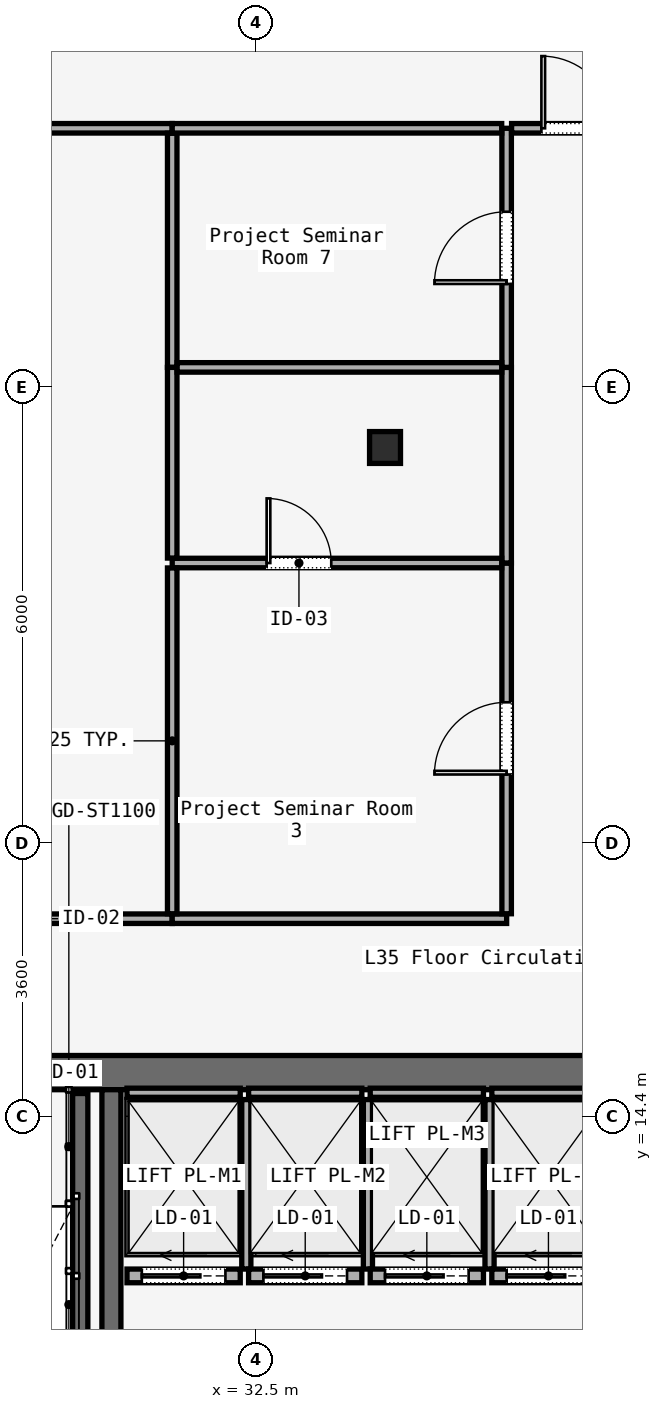
"""IFC4 building model, lengths in metres.
Left out: names, types, materials, properties, quantities, classifications, styles, units other than length and angle.
Written with IfcOpenShell. Run it as: python <this file> out.ifc"""

import sys

from ifc_helpers import new_model, si_unit, direction, frame, frame_2d, origin, origin_2d, place, context, subcontext, project, spatial, rectangle, i_section, extrude, element, fill, save


model = new_model("IFC4")
c1 = context("Model", 3, precision=1e-05, world=origin(), true_north=direction((0.0, 1.0)))
c2 = subcontext(c1, "Body", "Model", "MODEL_VIEW")
j1 = project(units=[si_unit("LENGTHUNIT", "METRE"), si_unit("PLANEANGLEUNIT", "RADIAN")], contexts=[c1])
p1 = place(None, origin())
s1 = spatial("IfcSite", under=j1, at=p1, CompositionType="ELEMENT")
p2 = place(p1, origin())
s2 = spatial("IfcBuilding", under=s1, at=p2, CompositionType="ELEMENT")
p3 = place(p2, frame((0.0, 0.0, 149.8)))
s3 = spatial("IfcBuildingStorey", under=s2, at=p3, CompositionType="ELEMENT", Elevation=149.8)
p4 = place(p3, frame((26.45, 14.975, 0.0), z_axis=(0.0, 0.0, 1.0), x_axis=(1.0, 0.0, 0.0)))
e1 = element("IfcWall", 1, at=p4, inside=s3, PredefinedType="SOLIDWALL", context=c2, shape_type="SweptSolid", body=[
    extrude(rectangle(XDim=31.1, YDim=0.45, at=frame_2d((15.55, 0.0))), origin(), (0.0, 0.0, 1.0), 3.58),
])
p5 = place(p4, frame((1.65, 0.0, 0.0)))
e2 = element("IfcOpeningElement", 2, at=p5, cuts=e1, PredefinedType="OPENING", context=c2, shape_type="SweptSolid", body=[
    extrude(rectangle(XDim=1.1, YDim=2.2, at=frame_2d((0.55, 1.1))), frame((0.0, 0.225, 0.0), z_axis=(0.0, -1.0, 0.0), x_axis=(1.0, 0.0, 0.0)), (0.0, 0.0, 1.0), 0.45),
])
p6 = place(p4, frame((13.65, 0.0, 0.0)))
e3 = element("IfcOpeningElement", 3, at=p6, cuts=e1, PredefinedType="OPENING", context=c2, shape_type="SweptSolid", body=[
    extrude(rectangle(XDim=1.1, YDim=2.2, at=frame_2d((0.55, 1.1))), frame((0.0, 0.225, 0.0), z_axis=(0.0, -1.0, 0.0), x_axis=(1.0, 0.0, 0.0)), (0.0, 0.0, 1.0), 0.45),
])
p7 = place(p4, frame((25.55, 0.0, 0.0)))
e4 = element("IfcOpeningElement", 4, at=p7, cuts=e1, PredefinedType="OPENING", context=c2, shape_type="SweptSolid", body=[
    extrude(rectangle(XDim=1.1, YDim=2.2, at=frame_2d((0.55, 1.1))), frame((0.0, 0.225, 0.0), z_axis=(0.0, -1.0, 0.0), x_axis=(1.0, 0.0, 0.0)), (0.0, 0.0, 1.0), 0.45),
])
p8 = place(p4, frame((10.7, 0.0, 0.0)))
e5 = element("IfcOpeningElement", 5, at=p8, cuts=e1, PredefinedType="OPENING", context=c2, shape_type="SweptSolid", body=[
    extrude(rectangle(XDim=1.4, YDim=2.2, at=frame_2d((0.7, 1.1))), frame((0.0, 0.225, 0.0), z_axis=(0.0, -1.0, 0.0), x_axis=(1.0, 0.0, 0.0)), (0.0, 0.0, 1.0), 0.45),
])
p9 = place(p4, frame((19.35, 0.0, 0.0)))
e6 = element("IfcOpeningElement", 6, at=p9, cuts=e1, PredefinedType="OPENING", context=c2, shape_type="SweptSolid", body=[
    extrude(rectangle(XDim=1.1, YDim=2.2, at=frame_2d((0.55, 1.1))), frame((0.0, 0.225, 0.0), z_axis=(0.0, -1.0, 0.0), x_axis=(1.0, 0.0, 0.0)), (0.0, 0.0, 1.0), 0.45),
])
p10 = place(p4, frame((21.4, 0.0, 0.0)))
e7 = element("IfcOpeningElement", 7, at=p10, cuts=e1, PredefinedType="OPENING", context=c2, shape_type="SweptSolid", body=[
    extrude(rectangle(XDim=0.9, YDim=2.1, at=frame_2d((0.45, 1.05))), frame((0.0, 0.225, 0.0), z_axis=(0.0, -1.0, 0.0), x_axis=(1.0, 0.0, 0.0)), (0.0, 0.0, 1.0), 0.45),
])
p11 = place(p4, frame((23.35, 0.0, 0.0)))
e8 = element("IfcOpeningElement", 8, at=p11, cuts=e1, PredefinedType="OPENING", context=c2, shape_type="SweptSolid", body=[
    extrude(rectangle(XDim=1.3, YDim=2.3, at=frame_2d((0.65, 1.15))), frame((0.0, 0.225, 0.0), z_axis=(0.0, -1.0, 0.0), x_axis=(1.0, 0.0, 0.0)), (0.0, 0.0, 1.0), 0.45),
])
p12 = place(p3, frame((30.6, 5.85, 0.0), z_axis=(0.0, 0.0, 1.0), x_axis=(0.0, 1.0, 0.0)))
e9 = element("IfcWall", 9, at=p12, inside=s3, PredefinedType="SOLIDWALL", context=c2, shape_type="SweptSolid", body=[
    extrude(rectangle(XDim=8.9, YDim=0.25, at=frame_2d((4.45, 0.0))), origin(), (0.0, 0.0, 1.0), 3.58),
])
p13 = place(p3, frame((34.2, 23.2, 0.0), z_axis=(0.0, 0.0, 1.0), x_axis=(1.0, 0.0, 0.0)))
e10 = element("IfcColumn", 10, at=p13, inside=s3, PredefinedType="COLUMN", context=c2, shape_type="SweptSolid", body=[
    extrude(i_section(OverallWidth=0.407, OverallDepth=0.419, WebThickness=0.031, FlangeThickness=0.049, FilletRadius=0.015, at=origin_2d()), origin(), (0.0, 0.0, 1.0), 3.58),
])
p14 = place(p3, frame((30.19, 14.7, 0.0), z_axis=(0.0, 0.0, 1.0), x_axis=(0.0, -1.0, 0.0)))
e11 = element("IfcWall", 11, at=p14, inside=s3, PredefinedType="SOLIDWALL", context=c2, shape_type="SweptSolid", body=[
    extrude(rectangle(XDim=7.65, YDim=0.2, at=frame_2d((3.825, 0.0))), origin(), (0.0, 0.0, 1.0), 3.8),
])
p15 = place(p3, frame((30.805, 12.3, 0.0), z_axis=(0.0, 0.0, 1.0), x_axis=(1.0, 0.0, 0.0)))
e12 = element("IfcWall", 12, at=p15, inside=s3, PredefinedType="SOLIDWALL", context=c2, shape_type="SweptSolid", body=[
    extrude(rectangle(XDim=1.49, YDim=0.18, at=frame_2d((0.745, 0.0))), origin(), (0.0, 0.0, 1.0), 3.01),
])
p16 = place(p15, frame((0.195, 0.0, 0.0)))
e13 = element("IfcOpeningElement", 13, at=p16, cuts=e12, PredefinedType="OPENING", context=c2, shape_type="SweptSolid", body=[
    extrude(rectangle(XDim=1.1, YDim=2.2, at=frame_2d((0.55, 1.1))), frame((0.0, 0.09, 0.0), z_axis=(0.0, -1.0, 0.0), x_axis=(1.0, 0.0, 0.0)), (0.0, 0.0, 1.0), 0.18),
])
p17 = place(p3, frame((30.805, 14.71, 0.0), z_axis=(0.0, 0.0, 1.0), x_axis=(1.0, 0.0, 0.0)))
e14 = element("IfcWall", 14, at=p17, inside=s3, PredefinedType="SOLIDWALL", context=c2, shape_type="SweptSolid", body=[
    extrude(rectangle(XDim=1.49, YDim=0.12, at=frame_2d((0.745, 0.0))), origin(), (0.0, 0.0, 1.0), 3.01),
])
p18 = place(p3, frame((32.375, 12.39, 0.0), z_axis=(0.0, 0.0, 1.0), x_axis=(0.0, 1.0, 0.0)))
e15 = element("IfcWall", 15, at=p18, inside=s3, PredefinedType="SOLIDWALL", context=c2, shape_type="SweptSolid", body=[
    extrude(rectangle(XDim=2.23, YDim=0.12, at=frame_2d((1.115, 0.0))), origin(), (0.0, 0.0, 1.0), 3.01),
])
p19 = place(p3, frame((32.405, 12.3, 0.0), z_axis=(0.0, 0.0, 1.0), x_axis=(1.0, 0.0, 0.0)))
e16 = element("IfcWall", 16, at=p19, inside=s3, PredefinedType="SOLIDWALL", context=c2, shape_type="SweptSolid", body=[
    extrude(rectangle(XDim=1.49, YDim=0.18, at=frame_2d((0.745, 0.0))), origin(), (0.0, 0.0, 1.0), 3.01),
])
p20 = place(p19, frame((0.195, 0.0, 0.0)))
e17 = element("IfcOpeningElement", 17, at=p20, cuts=e16, PredefinedType="OPENING", context=c2, shape_type="SweptSolid", body=[
    extrude(rectangle(XDim=1.1, YDim=2.2, at=frame_2d((0.55, 1.1))), frame((0.0, 0.09, 0.0), z_axis=(0.0, -1.0, 0.0), x_axis=(1.0, 0.0, 0.0)), (0.0, 0.0, 1.0), 0.18),
])
p21 = place(p3, frame((32.405, 14.71, 0.0), z_axis=(0.0, 0.0, 1.0), x_axis=(1.0, 0.0, 0.0)))
e18 = element("IfcWall", 18, at=p21, inside=s3, PredefinedType="SOLIDWALL", context=c2, shape_type="SweptSolid", body=[
    extrude(rectangle(XDim=1.49, YDim=0.12, at=frame_2d((0.745, 0.0))), origin(), (0.0, 0.0, 1.0), 3.01),
])
p22 = place(p3, frame((33.975, 12.39, 0.0), z_axis=(0.0, 0.0, 1.0), x_axis=(0.0, 1.0, 0.0)))
e19 = element("IfcWall", 19, at=p22, inside=s3, PredefinedType="SOLIDWALL", context=c2, shape_type="SweptSolid", body=[
    extrude(rectangle(XDim=2.23, YDim=0.12, at=frame_2d((1.115, 0.0))), origin(), (0.0, 0.0, 1.0), 3.01),
])
p23 = place(p3, frame((34.005, 12.3, 0.0), z_axis=(0.0, 0.0, 1.0), x_axis=(1.0, 0.0, 0.0)))
e20 = element("IfcWall", 20, at=p23, inside=s3, PredefinedType="SOLIDWALL", context=c2, shape_type="SweptSolid", body=[
    extrude(rectangle(XDim=1.49, YDim=0.18, at=frame_2d((0.745, 0.0))), origin(), (0.0, 0.0, 1.0), 3.01),
])
p24 = place(p23, frame((0.195, 0.0, 0.0)))
e21 = element("IfcOpeningElement", 21, at=p24, cuts=e20, PredefinedType="OPENING", context=c2, shape_type="SweptSolid", body=[
    extrude(rectangle(XDim=1.1, YDim=2.2, at=frame_2d((0.55, 1.1))), frame((0.0, 0.09, 0.0), z_axis=(0.0, -1.0, 0.0), x_axis=(1.0, 0.0, 0.0)), (0.0, 0.0, 1.0), 0.18),
])
p25 = place(p3, frame((34.005, 14.71, 0.0), z_axis=(0.0, 0.0, 1.0), x_axis=(1.0, 0.0, 0.0)))
e22 = element("IfcWall", 22, at=p25, inside=s3, PredefinedType="SOLIDWALL", context=c2, shape_type="SweptSolid", body=[
    extrude(rectangle(XDim=1.49, YDim=0.12, at=frame_2d((0.745, 0.0))), origin(), (0.0, 0.0, 1.0), 3.01),
])
p26 = place(p3, frame((35.575, 12.39, 0.0), z_axis=(0.0, 0.0, 1.0), x_axis=(0.0, 1.0, 0.0)))
e23 = element("IfcWall", 23, at=p26, inside=s3, PredefinedType="SOLIDWALL", context=c2, shape_type="SweptSolid", body=[
    extrude(rectangle(XDim=2.23, YDim=0.12, at=frame_2d((1.115, 0.0))), origin(), (0.0, 0.0, 1.0), 3.01),
])
p27 = place(p3, frame((35.605, 12.3, 0.0), z_axis=(0.0, 0.0, 1.0), x_axis=(1.0, 0.0, 0.0)))
e24 = element("IfcWall", 24, at=p27, inside=s3, PredefinedType="SOLIDWALL", context=c2, shape_type="SweptSolid", body=[
    extrude(rectangle(XDim=1.49, YDim=0.18, at=frame_2d((0.745, 0.0))), origin(), (0.0, 0.0, 1.0), 3.01),
])
p28 = place(p27, frame((0.195, 0.0, 0.0)))
e25 = element("IfcOpeningElement", 25, at=p28, cuts=e24, PredefinedType="OPENING", context=c2, shape_type="SweptSolid", body=[
    extrude(rectangle(XDim=1.1, YDim=2.2, at=frame_2d((0.55, 1.1))), frame((0.0, 0.09, 0.0), z_axis=(0.0, -1.0, 0.0), x_axis=(1.0, 0.0, 0.0)), (0.0, 0.0, 1.0), 0.18),
])
p29 = place(p3, frame((35.605, 14.71, 0.0), z_axis=(0.0, 0.0, 1.0), x_axis=(1.0, 0.0, 0.0)))
e26 = element("IfcWall", 26, at=p29, inside=s3, PredefinedType="SOLIDWALL", context=c2, shape_type="SweptSolid", body=[
    extrude(rectangle(XDim=1.49, YDim=0.12, at=frame_2d((0.745, 0.0))), origin(), (0.0, 0.0, 1.0), 3.01),
])
p30 = place(p3, frame((25.665, 17.0, 0.0), z_axis=(0.0, 0.0, 1.0), x_axis=(1.0, 0.0, 0.0)))
e27 = element("IfcWall", 27, at=p30, inside=s3, PredefinedType="PARTITIONING", context=c2, shape_type="SweptSolid", body=[
    extrude(rectangle(XDim=5.735, YDim=0.125, at=frame_2d((2.867, 0.0))), origin(), (0.0, 0.0, 1.0), 3.01),
])
p31 = place(p30, frame((2.167, 0.0, 0.0)))
e28 = element("IfcOpeningElement", 28, at=p31, cuts=e27, PredefinedType="OPENING", context=c2, shape_type="SweptSolid", body=[
    extrude(rectangle(XDim=1.4, YDim=2.2, at=frame_2d((0.7, 1.1))), frame((0.0, 0.062, 0.0), z_axis=(0.0, -1.0, 0.0), x_axis=(1.0, 0.0, 0.0)), (0.0, 0.0, 1.0), 0.125),
])
p32 = place(p3, frame((31.4, 17.0, 0.0), z_axis=(0.0, 0.0, 1.0), x_axis=(1.0, 0.0, 0.0)))
e29 = element("IfcWall", 29, at=p32, inside=s3, PredefinedType="PARTITIONING", context=c2, shape_type="SweptSolid", body=[
    extrude(rectangle(XDim=4.4, YDim=0.125, at=frame_2d((2.2, 0.0))), origin(), (0.0, 0.0, 1.0), 3.01),
])
p33 = place(p3, frame((35.8, 17.065, 0.0), z_axis=(0.0, 0.0, 1.0), x_axis=(0.0, 1.0, 0.0)))
e30 = element("IfcWall", 30, at=p33, inside=s3, PredefinedType="PARTITIONING", context=c2, shape_type="SweptSolid", body=[
    extrude(rectangle(XDim=4.615, YDim=0.125, at=frame_2d((2.308, 0.0))), origin(), (0.0, 0.0, 1.0), 3.01),
])
p34 = place(p33, frame((1.833, 0.0, 0.0)))
e31 = element("IfcOpeningElement", 31, at=p34, cuts=e30, PredefinedType="OPENING", context=c2, shape_type="SweptSolid", body=[
    extrude(rectangle(XDim=0.95, YDim=2.2, at=frame_2d((0.475, 1.1))), frame((0.0, 0.062, 0.0), z_axis=(0.0, -1.0, 0.0), x_axis=(1.0, 0.0, 0.0)), (0.0, 0.0, 1.0), 0.125),
])
p35 = place(p3, frame((35.8, 21.68, 0.0), z_axis=(0.0, 0.0, 1.0), x_axis=(0.0, 1.0, 0.0)))
e32 = element("IfcWall", 32, at=p35, inside=s3, PredefinedType="PARTITIONING", context=c2, shape_type="SweptSolid", body=[
    extrude(rectangle(XDim=2.574, YDim=0.125, at=frame_2d((1.287, 0.0))), origin(), (0.0, 0.0, 1.0), 3.01),
])
p36 = place(p3, frame((35.8, 24.254, 0.0), z_axis=(0.0, 0.0, 1.0), x_axis=(0.0, 1.0, 0.0)))
e33 = element("IfcWall", 33, at=p36, inside=s3, PredefinedType="PARTITIONING", context=c2, shape_type="SweptSolid", body=[
    extrude(rectangle(XDim=3.146, YDim=0.125, at=frame_2d((1.573, 0.0))), origin(), (0.0, 0.0, 1.0), 3.01),
])
p37 = place(p36, frame((1.098, 0.0, 0.0)))
e34 = element("IfcOpeningElement", 34, at=p37, cuts=e33, PredefinedType="OPENING", context=c2, shape_type="SweptSolid", body=[
    extrude(rectangle(XDim=0.95, YDim=2.2, at=frame_2d((0.475, 1.1))), frame((0.0, 0.062, 0.0), z_axis=(0.0, -1.0, 0.0), x_axis=(1.0, 0.0, 0.0)), (0.0, 0.0, 1.0), 0.125),
])
p38 = place(p3, frame((35.865, 27.4, 0.0), z_axis=(0.0, 0.0, 1.0), x_axis=(1.0, 0.0, 0.0)))
e35 = element("IfcWall", 35, at=p38, inside=s3, PredefinedType="PARTITIONING", context=c2, shape_type="SweptSolid", body=[
    extrude(rectangle(XDim=1.735, YDim=0.125, at=frame_2d((0.868, 0.0))), origin(), (0.0, 0.0, 1.0), 3.01),
])
p39 = place(p38, frame((0.393, 0.0, 0.0)))
e36 = element("IfcOpeningElement", 36, at=p39, cuts=e35, PredefinedType="OPENING", context=c2, shape_type="SweptSolid", body=[
    extrude(rectangle(XDim=0.95, YDim=2.2, at=frame_2d((0.475, 1.1))), frame((0.0, 0.062, 0.0), z_axis=(0.0, -1.0, 0.0), x_axis=(1.0, 0.0, 0.0)), (0.0, 0.0, 1.0), 0.125),
])
p40 = place(p3, frame((31.4, 21.68, 0.0), z_axis=(0.0, 0.0, 1.0), x_axis=(1.0, 0.0, 0.0)))
e37 = element("IfcWall", 37, at=p40, inside=s3, PredefinedType="PARTITIONING", context=c2, shape_type="SweptSolid", body=[
    extrude(rectangle(XDim=4.335, YDim=0.125, at=frame_2d((2.167, 0.0))), origin(), (0.0, 0.0, 1.0), 3.01),
])
p41 = place(p40, frame((1.242, 0.0, 0.0)))
e38 = element("IfcOpeningElement", 38, at=p41, cuts=e37, PredefinedType="OPENING", context=c2, shape_type="SweptSolid", body=[
    extrude(rectangle(XDim=0.85, YDim=2.15, at=frame_2d((0.425, 1.075))), frame((0.0, 0.062, 0.0), z_axis=(0.0, -1.0, 0.0), x_axis=(1.0, 0.0, 0.0)), (0.0, 0.0, 1.0), 0.125),
])
p42 = place(p3, frame((31.4, 17.065, 0.0), z_axis=(0.0, 0.0, 1.0), x_axis=(0.0, 1.0, 0.0)))
e39 = element("IfcWall", 39, at=p42, inside=s3, PredefinedType="PARTITIONING", context=c2, shape_type="SweptSolid", body=[
    extrude(rectangle(XDim=4.55, YDim=0.125, at=frame_2d((2.275, 0.0))), origin(), (0.0, 0.0, 1.0), 3.01),
])
p43 = place(p3, frame((25.581, 27.4, 0.0), z_axis=(0.0, 0.0, 1.0), x_axis=(1.0, 0.0, 0.0)))
e40 = element("IfcWall", 40, at=p43, inside=s3, PredefinedType="PARTITIONING", context=c2, shape_type="SweptSolid", body=[
    extrude(rectangle(XDim=5.819, YDim=0.125, at=frame_2d((2.91, 0.0))), origin(), (0.0, 0.0, 1.0), 3.01),
])
p44 = place(p3, frame((31.4, 27.335, 0.0), z_axis=(0.0, 0.0, 1.0), x_axis=(0.0, -1.0, 0.0)))
e41 = element("IfcWall", 41, at=p44, inside=s3, PredefinedType="PARTITIONING", context=c2, shape_type="SweptSolid", body=[
    extrude(rectangle(XDim=3.081, YDim=0.125, at=frame_2d((1.541, 0.0))), origin(), (0.0, 0.0, 1.0), 3.01),
])
p45 = place(p3, frame((31.4, 24.254, 0.0), z_axis=(0.0, 0.0, 1.0), x_axis=(0.0, -1.0, 0.0)))
e42 = element("IfcWall", 42, at=p45, inside=s3, PredefinedType="PARTITIONING", context=c2, shape_type="SweptSolid", body=[
    extrude(rectangle(XDim=2.509, YDim=0.125, at=frame_2d((1.254, 0.0))), origin(), (0.0, 0.0, 1.0), 3.01),
])
p46 = place(p3, frame((31.465, 24.254, 0.0), z_axis=(0.0, 0.0, 1.0), x_axis=(1.0, 0.0, 0.0)))
e43 = element("IfcWall", 43, at=p46, inside=s3, PredefinedType="PARTITIONING", context=c2, shape_type="SweptSolid", body=[
    extrude(rectangle(XDim=4.27, YDim=0.125, at=frame_2d((2.135, 0.0))), origin(), (0.0, 0.0, 1.0), 3.01),
])
p47 = place(p3, frame((31.4, 27.4, 0.0), z_axis=(0.0, 0.0, 1.0), x_axis=(1.0, 0.0, 0.0)))
e44 = element("IfcWall", 44, at=p47, inside=s3, PredefinedType="PARTITIONING", context=c2, shape_type="SweptSolid", body=[
    extrude(rectangle(XDim=4.335, YDim=0.125, at=frame_2d((2.167, 0.0))), origin(), (0.0, 0.0, 1.0), 3.01),
])
p48 = place(p16, origin())
e45 = element("IfcDoor", 45, at=p48, inside=s3, OperationType="SLIDING_TO_LEFT", PredefinedType="DOOR", context=c2, shape_type="SweptSolid", body=[
    extrude(rectangle(XDim=1.1, YDim=2.2, at=frame_2d((0.55, 1.1))), frame((0.0, 0.025, 0.0), z_axis=(0.0, -1.0, 0.0), x_axis=(1.0, 0.0, 0.0)), (0.0, 0.0, 1.0), 0.05),
])
fill(e13, e45)
p49 = place(p20, origin())
e46 = element("IfcDoor", 46, at=p49, inside=s3, OperationType="SLIDING_TO_LEFT", PredefinedType="DOOR", context=c2, shape_type="SweptSolid", body=[
    extrude(rectangle(XDim=1.1, YDim=2.2, at=frame_2d((0.55, 1.1))), frame((0.0, 0.025, 0.0), z_axis=(0.0, -1.0, 0.0), x_axis=(1.0, 0.0, 0.0)), (0.0, 0.0, 1.0), 0.05),
])
fill(e17, e46)
p50 = place(p24, origin())
e47 = element("IfcDoor", 47, at=p50, inside=s3, OperationType="SLIDING_TO_LEFT", PredefinedType="DOOR", context=c2, shape_type="SweptSolid", body=[
    extrude(rectangle(XDim=1.1, YDim=2.2, at=frame_2d((0.55, 1.1))), frame((0.0, 0.025, 0.0), z_axis=(0.0, -1.0, 0.0), x_axis=(1.0, 0.0, 0.0)), (0.0, 0.0, 1.0), 0.05),
])
fill(e21, e47)
p51 = place(p28, origin())
e48 = element("IfcDoor", 48, at=p51, inside=s3, OperationType="SLIDING_TO_LEFT", PredefinedType="DOOR", context=c2, shape_type="SweptSolid", body=[
    extrude(rectangle(XDim=1.1, YDim=2.2, at=frame_2d((0.55, 1.1))), frame((0.0, 0.025, 0.0), z_axis=(0.0, -1.0, 0.0), x_axis=(1.0, 0.0, 0.0)), (0.0, 0.0, 1.0), 0.05),
])
fill(e25, e48)
p52 = place(p34, origin())
e49 = element("IfcDoor", 49, at=p52, inside=s3, OperationType="SINGLE_SWING_RIGHT", PredefinedType="DOOR", context=c2, shape_type="SweptSolid", body=[
    extrude(rectangle(XDim=0.95, YDim=2.2, at=frame_2d((0.475, 1.1))), frame((0.0, 0.025, 0.0), z_axis=(0.0, -1.0, 0.0), x_axis=(1.0, 0.0, 0.0)), (0.0, 0.0, 1.0), 0.05),
])
fill(e31, e49)
p53 = place(p41, origin())
e50 = element("IfcDoor", 50, at=p53, inside=s3, OperationType="SINGLE_SWING_LEFT", PredefinedType="DOOR", context=c2, shape_type="SweptSolid", body=[
    extrude(rectangle(XDim=0.85, YDim=2.15, at=frame_2d((0.425, 1.075))), frame((0.0, 0.025, 0.0), z_axis=(0.0, -1.0, 0.0), x_axis=(1.0, 0.0, 0.0)), (0.0, 0.0, 1.0), 0.05),
])
fill(e38, e50)
p54 = place(p37, origin())
e51 = element("IfcDoor", 51, at=p54, inside=s3, OperationType="SINGLE_SWING_RIGHT", PredefinedType="DOOR", context=c2, shape_type="SweptSolid", body=[
    extrude(rectangle(XDim=0.95, YDim=2.2, at=frame_2d((0.475, 1.1))), frame((0.0, 0.025, 0.0), z_axis=(0.0, -1.0, 0.0), x_axis=(1.0, 0.0, 0.0)), (0.0, 0.0, 1.0), 0.05),
])
fill(e34, e51)
p55 = place(p39, origin())
e52 = element("IfcDoor", 52, at=p55, inside=s3, OperationType="SINGLE_SWING_LEFT", PredefinedType="DOOR", context=c2, shape_type="SweptSolid", body=[
    extrude(rectangle(XDim=0.95, YDim=2.2, at=frame_2d((0.475, 1.1))), frame((0.0, 0.025, 0.0), z_axis=(0.0, -1.0, 0.0), x_axis=(1.0, 0.0, 0.0)), (0.0, 0.0, 1.0), 0.05),
])
fill(e36, e52)
save(model, sys.argv[1])
